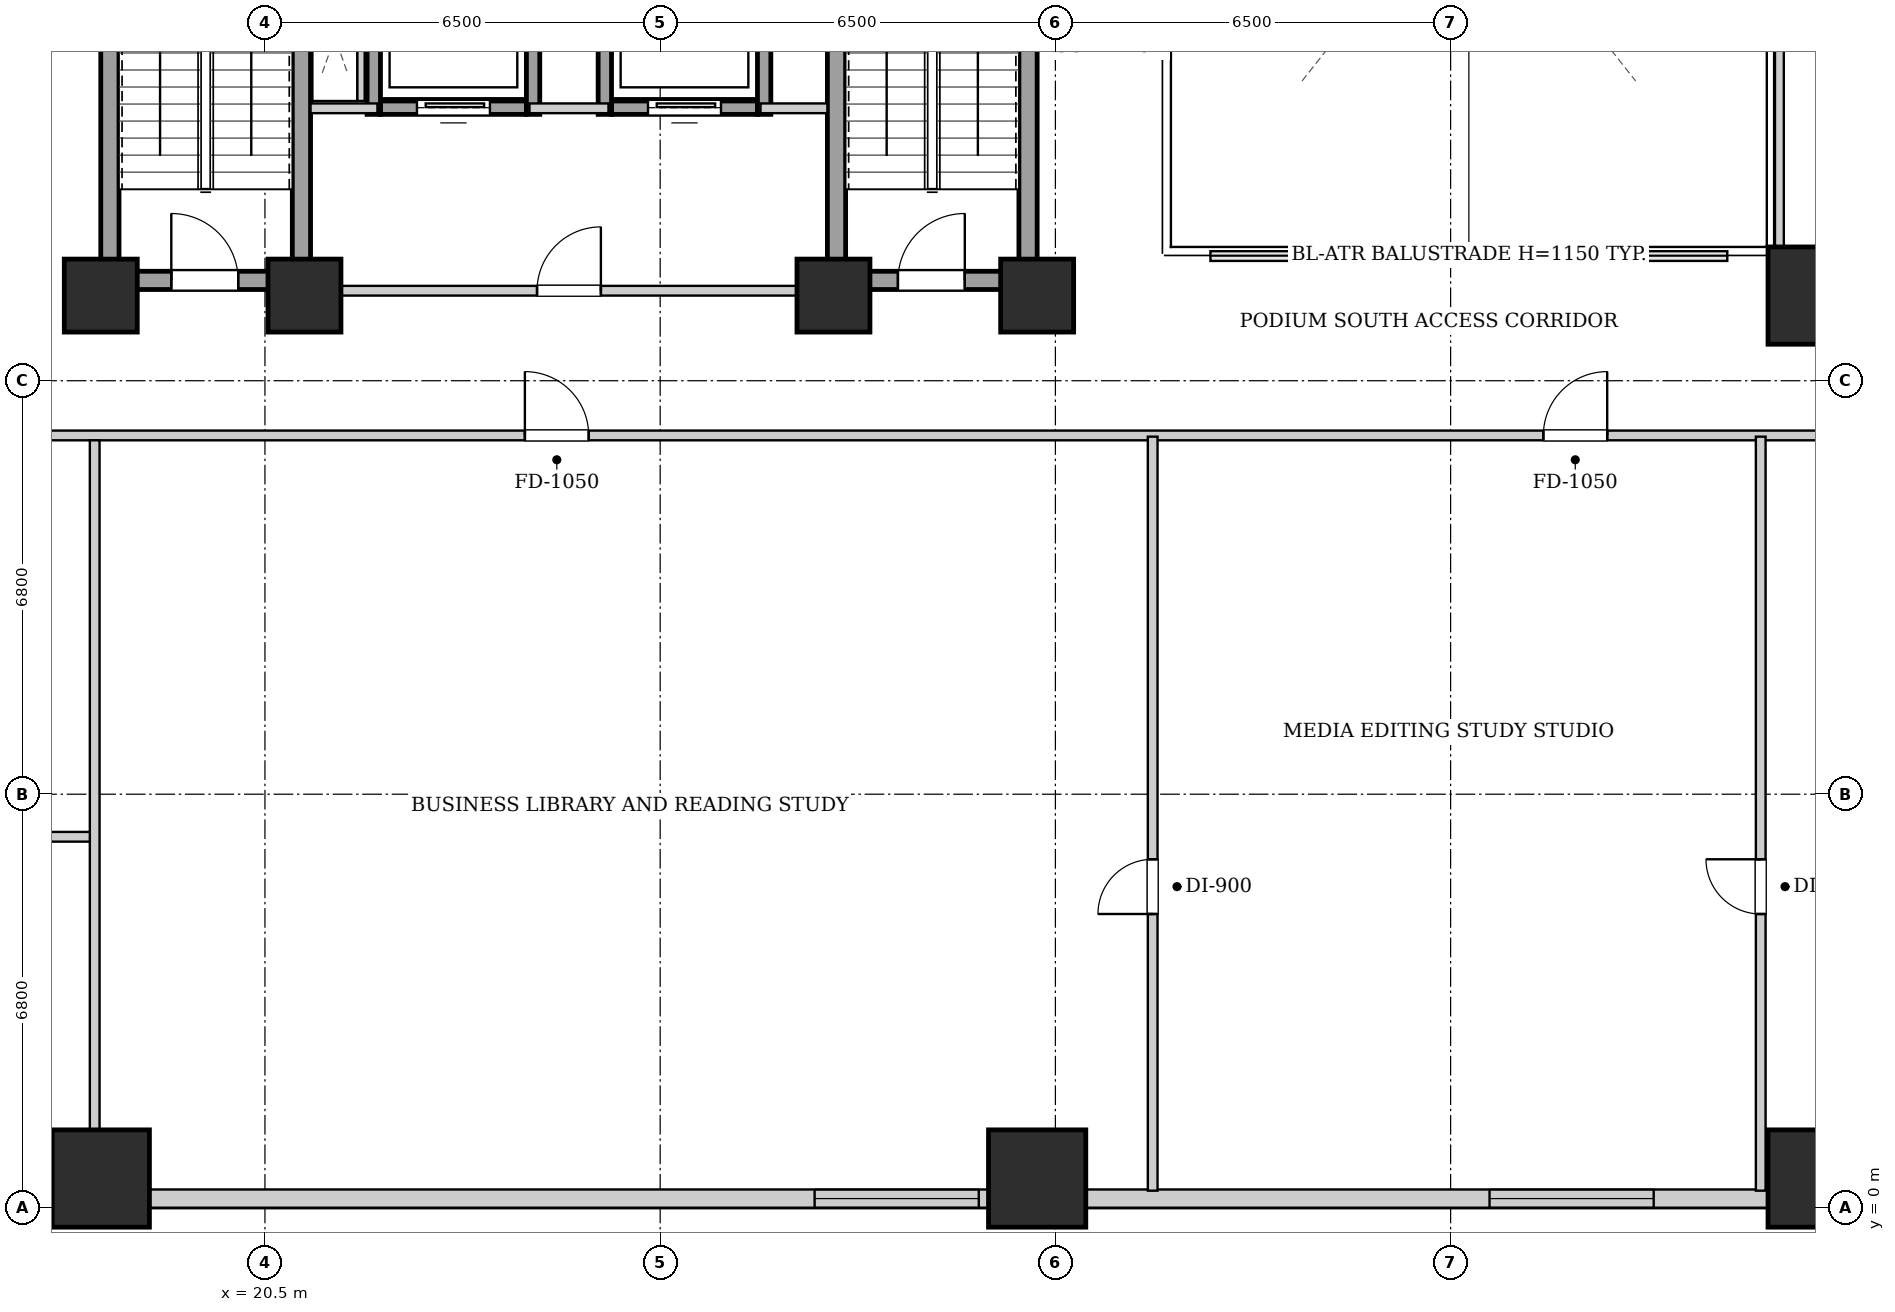
"""IFC4 building model, lengths in metres.
Left out: names, types, materials, properties, quantities, classifications, styles, units other than length and angle.
Written with IfcOpenShell. Run it as: python <this file> out.ifc"""

import sys

from ifc_helpers import new_model, si_unit, direction, frame, frame_2d, origin, origin_2d, place, context, subcontext, project, spatial, rectangle, extrude, element, fill, save


model = new_model("IFC4")
c1 = context("Model", 3, precision=1e-05, world=origin(), true_north=direction((0.0, 1.0)))
c2 = subcontext(c1, "Body", "Model", "MODEL_VIEW")
j1 = project(units=[si_unit("LENGTHUNIT", "METRE"), si_unit("PLANEANGLEUNIT", "RADIAN")], contexts=[c1])
p1 = place(None, origin())
s1 = spatial("IfcSite", under=j1, at=p1, CompositionType="ELEMENT")
p2 = place(p1, origin())
s2 = spatial("IfcBuilding", under=s1, at=p2, CompositionType="ELEMENT")
p3 = place(p2, frame((0.0, 0.0, 11.2)))
s3 = spatial("IfcBuildingStorey", under=s2, at=p3, CompositionType="ELEMENT", Elevation=11.2)
for number, where, z_axis, x_axis in (
    (1, (46.02, 0.48, 0.0), (0.0, 0.0, 1.0), (1.0, 0.0, 0.0)),
    (2, (46.02, 15.0, 0.0), (0.0, 0.0, 1.0), (1.0, 0.0, 0.0)),
    (3, (17.8, 0.48, 0.0), (0.0, 0.0, 1.0), (1.0, 0.0, 0.0)),
    (4, (33.2, 0.48, 0.0), (0.0, 0.0, 1.0), (1.0, 0.0, 0.0)),
):
    element("IfcColumn", number, at=place(p3, frame(where, z_axis=z_axis, x_axis=x_axis)), inside=s3, PredefinedType="COLUMN", context=c2, shape_type="SweptSolid", body=[
        extrude(rectangle(XDim=1.6, YDim=1.6, at=origin_2d()), origin(), (0.0, 0.0, 1.0), 4.8),
    ])
for number, where, z_axis, x_axis in (
    (5, (17.8, 15.0, 0.0), (0.0, 0.0, 1.0), (1.0, 0.0, 0.0)),
    (6, (21.15, 15.0, 0.0), (0.0, 0.0, 1.0), (1.0, 0.0, 0.0)),
    (7, (29.85, 15.0, 0.0), (0.0, 0.0, 1.0), (1.0, 0.0, 0.0)),
    (8, (33.2, 15.0, 0.0), (0.0, 0.0, 1.0), (1.0, 0.0, 0.0)),
):
    element("IfcColumn", number, at=place(p3, frame(where, z_axis=z_axis, x_axis=x_axis)), inside=s3, PredefinedType="COLUMN", context=c2, shape_type="SweptSolid", body=[
        extrude(rectangle(XDim=1.2, YDim=1.2, at=origin_2d()), origin(), (0.0, 0.0, 1.0), 4.8),
    ])
p4 = place(p3, frame((53.84, 0.15, 0.0), z_axis=(0.0, 0.0, 1.0), x_axis=(-1.0, 0.0, 0.0)))
e9 = element("IfcWall", 9, at=p4, inside=s3, PredefinedType="SOLIDWALL", context=c2, shape_type="SweptSolid", body=[
    extrude(rectangle(XDim=53.68, YDim=0.3, at=frame_2d((26.84, 0.0))), origin(), (0.0, 0.0, 1.0), 3.365),
])
p5 = place(p4, frame((4.0, 0.0, 0.9)))
e10 = element("IfcOpeningElement", 10, at=p5, cuts=e9, PredefinedType="OPENING", context=c2, shape_type="SweptSolid", body=[
    extrude(rectangle(XDim=2.7, YDim=2.1, at=frame_2d((1.35, 1.05))), frame((0.0, 0.16, 0.0), z_axis=(0.0, -1.0, 0.0), x_axis=(1.0, 0.0, 0.0)), (0.0, 0.0, 1.0), 0.32),
])
p6 = place(p4, frame((10.5, 0.0, 0.9)))
e11 = element("IfcOpeningElement", 11, at=p6, cuts=e9, PredefinedType="OPENING", context=c2, shape_type="SweptSolid", body=[
    extrude(rectangle(XDim=2.7, YDim=2.1, at=frame_2d((1.35, 1.05))), frame((0.0, 0.16, 0.0), z_axis=(0.0, -1.0, 0.0), x_axis=(1.0, 0.0, 0.0)), (0.0, 0.0, 1.0), 0.32),
])
p7 = place(p4, frame((21.6, 0.0, 0.9)))
e12 = element("IfcOpeningElement", 12, at=p7, cuts=e9, PredefinedType="OPENING", context=c2, shape_type="SweptSolid", body=[
    extrude(rectangle(XDim=2.7, YDim=2.1, at=frame_2d((1.35, 1.05))), frame((0.0, 0.16, 0.0), z_axis=(0.0, -1.0, 0.0), x_axis=(1.0, 0.0, 0.0)), (0.0, 0.0, 1.0), 0.32),
])
p8 = place(p4, frame((37.0, 0.0, 0.9)))
e13 = element("IfcOpeningElement", 13, at=p8, cuts=e9, PredefinedType="OPENING", context=c2, shape_type="SweptSolid", body=[
    extrude(rectangle(XDim=2.7, YDim=2.1, at=frame_2d((1.35, 1.05))), frame((0.0, 0.16, 0.0), z_axis=(0.0, -1.0, 0.0), x_axis=(1.0, 0.0, 0.0)), (0.0, 0.0, 1.0), 0.32),
])
p9 = place(p4, frame((42.2, 0.0, 0.9)))
e14 = element("IfcOpeningElement", 14, at=p9, cuts=e9, PredefinedType="OPENING", context=c2, shape_type="SweptSolid", body=[
    extrude(rectangle(XDim=2.7, YDim=2.1, at=frame_2d((1.35, 1.05))), frame((0.0, 0.16, 0.0), z_axis=(0.0, -1.0, 0.0), x_axis=(1.0, 0.0, 0.0)), (0.0, 0.0, 1.0), 0.32),
])
for number, where, z_axis, x_axis in (
    (15, (17.95, 15.1, 0.0), (0.0, 0.0, 1.0), (0.0, 1.0, 0.0)),
    (16, (21.1, 15.1, 0.0), (0.0, 0.0, 1.0), (0.0, 1.0, 0.0)),
):
    element("IfcWall", number, at=place(p3, frame(where, z_axis=z_axis, x_axis=x_axis)), inside=s3, PredefinedType="SHEAR", context=c2, shape_type="SweptSolid", body=[
        extrude(rectangle(XDim=9.0, YDim=0.3, at=frame_2d((4.5, 0.0))), origin(), (0.0, 0.0, 1.0), 4.48),
    ])
p10 = place(p3, frame((18.1, 15.25, 0.0), z_axis=(0.0, 0.0, 1.0), x_axis=(1.0, 0.0, 0.0)))
e17 = element("IfcWall", 17, at=p10, inside=s3, PredefinedType="SHEAR", context=c2, shape_type="SweptSolid", body=[
    extrude(rectangle(XDim=2.85, YDim=0.3, at=frame_2d((1.425, 0.0))), origin(), (0.0, 0.0, 1.0), 4.48),
])
p11 = place(p10, frame((0.86, 0.0, 0.0)))
e18 = element("IfcOpeningElement", 18, at=p11, cuts=e17, PredefinedType="OPENING", context=c2, shape_type="SweptSolid", body=[
    extrude(rectangle(XDim=1.1, YDim=2.05, at=frame_2d((0.55, 1.025))), frame((0.0, 0.16, 0.0), z_axis=(0.0, -1.0, 0.0), x_axis=(1.0, 0.0, 0.0)), (0.0, 0.0, 1.0), 0.32),
])
for number, where, z_axis, x_axis in (
    (19, (29.9, 15.1, 0.0), (0.0, 0.0, 1.0), (0.0, 1.0, 0.0)),
    (20, (33.05, 15.1, 0.0), (0.0, 0.0, 1.0), (0.0, 1.0, 0.0)),
):
    element("IfcWall", number, at=place(p3, frame(where, z_axis=z_axis, x_axis=x_axis)), inside=s3, PredefinedType="SHEAR", context=c2, shape_type="SweptSolid", body=[
        extrude(rectangle(XDim=9.0, YDim=0.3, at=frame_2d((4.5, 0.0))), origin(), (0.0, 0.0, 1.0), 4.48),
    ])
p12 = place(p3, frame((30.05, 15.25, 0.0), z_axis=(0.0, 0.0, 1.0), x_axis=(1.0, 0.0, 0.0)))
e21 = element("IfcWall", 21, at=p12, inside=s3, PredefinedType="SHEAR", context=c2, shape_type="SweptSolid", body=[
    extrude(rectangle(XDim=2.85, YDim=0.3, at=frame_2d((1.425, 0.0))), origin(), (0.0, 0.0, 1.0), 4.48),
])
p13 = place(p12, frame((0.86, 0.0, 0.0)))
e22 = element("IfcOpeningElement", 22, at=p13, cuts=e21, PredefinedType="OPENING", context=c2, shape_type="SweptSolid", body=[
    extrude(rectangle(XDim=1.1, YDim=2.05, at=frame_2d((0.55, 1.025))), frame((0.0, 0.16, 0.0), z_axis=(0.0, -1.0, 0.0), x_axis=(1.0, 0.0, 0.0)), (0.0, 0.0, 1.0), 0.32),
])
p14 = place(p3, frame((22.4, 18.09, 0.0), z_axis=(0.0, 0.0, 1.0), x_axis=(1.0, 0.0, 0.0)))
e23 = element("IfcWall", 23, at=p14, inside=s3, PredefinedType="SHEAR", context=c2, shape_type="SweptSolid", body=[
    extrude(rectangle(XDim=2.4, YDim=0.22, at=frame_2d((1.2, 0.0))), origin(), (0.0, 0.0, 1.0), 4.48),
])
p15 = place(p14, frame((0.6, 0.0, 0.0)))
e24 = element("IfcOpeningElement", 24, at=p15, cuts=e23, PredefinedType="OPENING", context=c2, shape_type="SweptSolid", body=[
    extrude(rectangle(XDim=1.2, YDim=2.15, at=frame_2d((0.6, 1.075))), frame((0.0, 0.12, 0.0), z_axis=(0.0, -1.0, 0.0), x_axis=(1.0, 0.0, 0.0)), (0.0, 0.0, 1.0), 0.24),
])
for number, where, z_axis, x_axis in (
    (25, (22.29, 17.98, 0.0), (0.0, 0.0, 1.0), (0.0, 1.0, 0.0)),
    (26, (24.91, 17.98, 0.0), (0.0, 0.0, 1.0), (0.0, 1.0, 0.0)),
):
    element("IfcWall", number, at=place(p3, frame(where, z_axis=z_axis, x_axis=x_axis)), inside=s3, PredefinedType="SHEAR", context=c2, shape_type="SweptSolid", body=[
        extrude(rectangle(XDim=2.54, YDim=0.22, at=frame_2d((1.27, 0.0))), origin(), (0.0, 0.0, 1.0), 4.48),
    ])
p16 = place(p3, frame((26.2, 18.09, 0.0), z_axis=(0.0, 0.0, 1.0), x_axis=(1.0, 0.0, 0.0)))
e27 = element("IfcWall", 27, at=p16, inside=s3, PredefinedType="SHEAR", context=c2, shape_type="SweptSolid", body=[
    extrude(rectangle(XDim=2.4, YDim=0.22, at=frame_2d((1.2, 0.0))), origin(), (0.0, 0.0, 1.0), 4.48),
])
p17 = place(p16, frame((0.6, 0.0, 0.0)))
e28 = element("IfcOpeningElement", 28, at=p17, cuts=e27, PredefinedType="OPENING", context=c2, shape_type="SweptSolid", body=[
    extrude(rectangle(XDim=1.2, YDim=2.15, at=frame_2d((0.6, 1.075))), frame((0.0, 0.12, 0.0), z_axis=(0.0, -1.0, 0.0), x_axis=(1.0, 0.0, 0.0)), (0.0, 0.0, 1.0), 0.24),
])
for number, where, z_axis, x_axis in (
    (29, (26.09, 17.98, 0.0), (0.0, 0.0, 1.0), (0.0, 1.0, 0.0)),
    (30, (28.71, 17.98, 0.0), (0.0, 0.0, 1.0), (0.0, 1.0, 0.0)),
):
    element("IfcWall", number, at=place(p3, frame(where, z_axis=z_axis, x_axis=x_axis)), inside=s3, PredefinedType="SHEAR", context=c2, shape_type="SweptSolid", body=[
        extrude(rectangle(XDim=2.54, YDim=0.22, at=frame_2d((1.27, 0.0))), origin(), (0.0, 0.0, 1.0), 4.48),
    ])
p18 = place(p3, frame((21.25, 15.08, 0.0), z_axis=(0.0, 0.0, 1.0), x_axis=(1.0, 0.0, 0.0)))
e31 = element("IfcWall", 31, at=p18, inside=s3, PredefinedType="PARTITIONING", context=c2, shape_type="SweptSolid", body=[
    extrude(rectangle(XDim=8.5, YDim=0.16, at=frame_2d((4.25, 0.0))), origin(), (0.0, 0.0, 1.0), 4.48),
])
p19 = place(p18, frame((3.725, 0.0, 0.0)))
e32 = element("IfcOpeningElement", 32, at=p19, cuts=e31, PredefinedType="OPENING", context=c2, shape_type="SweptSolid", body=[
    extrude(rectangle(XDim=1.05, YDim=2.05, at=frame_2d((0.525, 1.025))), frame((0.0, 0.09, 0.0), z_axis=(0.0, -1.0, 0.0), x_axis=(1.0, 0.0, 0.0)), (0.0, 0.0, 1.0), 0.18),
])
p20 = place(p3, frame((21.25, 18.08, 0.0), z_axis=(0.0, 0.0, 1.0), x_axis=(1.0, 0.0, 0.0)))
e33 = element("IfcWall", 33, at=p20, inside=s3, PredefinedType="PARTITIONING", context=c2, shape_type="SweptSolid", body=[
    extrude(rectangle(XDim=1.1, YDim=0.16, at=frame_2d((0.55, 0.0))), origin(), (0.0, 0.0, 1.0), 4.48),
])
p21 = place(p3, frame((24.85, 18.08, 0.0), z_axis=(0.0, 0.0, 1.0), x_axis=(1.0, 0.0, 0.0)))
e34 = element("IfcWall", 34, at=p21, inside=s3, PredefinedType="PARTITIONING", context=c2, shape_type="SweptSolid", body=[
    extrude(rectangle(XDim=1.3, YDim=0.16, at=frame_2d((0.65, 0.0))), origin(), (0.0, 0.0, 1.0), 4.48),
])
p22 = place(p3, frame((28.65, 18.08, 0.0), z_axis=(0.0, 0.0, 1.0), x_axis=(1.0, 0.0, 0.0)))
e35 = element("IfcWall", 35, at=p22, inside=s3, PredefinedType="PARTITIONING", context=c2, shape_type="SweptSolid", body=[
    extrude(rectangle(XDim=1.1, YDim=0.16, at=frame_2d((0.55, 0.0))), origin(), (0.0, 0.0, 1.0), 4.48),
])
p23 = place(p3, frame((22.08, 18.2, 0.0), z_axis=(0.0, 0.0, 1.0), x_axis=(0.0, 1.0, 0.0)))
e36 = element("IfcWall", 36, at=p23, inside=s3, PredefinedType="PARTITIONING", context=c2, shape_type="SweptSolid", body=[
    extrude(rectangle(XDim=2.12, YDim=0.12, at=frame_2d((1.06, 0.0))), origin(), (0.0, 0.0, 1.0), 4.48),
])
p24 = place(p3, frame((5.8, 12.7, 0.0), z_axis=(0.0, 0.0, 1.0), x_axis=(1.0, 0.0, 0.0)))
e37 = element("IfcWall", 37, at=p24, inside=s3, PredefinedType="PARTITIONING", context=c2, shape_type="SweptSolid", body=[
    extrude(rectangle(XDim=47.92, YDim=0.16, at=frame_2d((23.96, 0.0))), origin(), (0.0, 0.0, 1.0), 4.48),
])
p25 = place(p24, frame((3.8, 0.0, 0.0)))
e38 = element("IfcOpeningElement", 38, at=p25, cuts=e37, PredefinedType="OPENING", context=c2, shape_type="SweptSolid", body=[
    extrude(rectangle(XDim=0.9, YDim=2.05, at=frame_2d((0.45, 1.025))), frame((0.0, 0.09, 0.0), z_axis=(0.0, -1.0, 0.0), x_axis=(1.0, 0.0, 0.0)), (0.0, 0.0, 1.0), 0.18),
])
p26 = place(p24, frame((9.32, 0.0, 0.0)))
e39 = element("IfcOpeningElement", 39, at=p26, cuts=e37, PredefinedType="OPENING", context=c2, shape_type="SweptSolid", body=[
    extrude(rectangle(XDim=0.86, YDim=2.05, at=frame_2d((0.43, 1.025))), frame((0.0, 0.09, 0.0), z_axis=(0.0, -1.0, 0.0), x_axis=(1.0, 0.0, 0.0)), (0.0, 0.0, 1.0), 0.18),
])
p27 = place(p24, frame((18.975, 0.0, 0.0)))
e40 = element("IfcOpeningElement", 40, at=p27, cuts=e37, PredefinedType="OPENING", context=c2, shape_type="SweptSolid", body=[
    extrude(rectangle(XDim=1.05, YDim=2.05, at=frame_2d((0.525, 1.025))), frame((0.0, 0.09, 0.0), z_axis=(0.0, -1.0, 0.0), x_axis=(1.0, 0.0, 0.0)), (0.0, 0.0, 1.0), 0.18),
])
p28 = place(p24, frame((35.725, 0.0, 0.0)))
e41 = element("IfcOpeningElement", 41, at=p28, cuts=e37, PredefinedType="OPENING", context=c2, shape_type="SweptSolid", body=[
    extrude(rectangle(XDim=1.05, YDim=2.05, at=frame_2d((0.525, 1.025))), frame((0.0, 0.09, 0.0), z_axis=(0.0, -1.0, 0.0), x_axis=(1.0, 0.0, 0.0)), (0.0, 0.0, 1.0), 0.18),
])
p29 = place(p3, frame((6.18, 6.1, 0.0), z_axis=(0.0, 0.0, 1.0), x_axis=(1.0, 0.0, 0.0)))
e42 = element("IfcWall", 42, at=p29, inside=s3, PredefinedType="PARTITIONING", context=c2, shape_type="SweptSolid", body=[
    extrude(rectangle(XDim=11.5, YDim=0.16, at=frame_2d((5.75, 0.0))), origin(), (0.0, 0.0, 1.0), 4.48),
])
p30 = place(p3, frame((17.7, 0.6, 0.0), z_axis=(0.0, 0.0, 1.0), x_axis=(0.0, 1.0, 0.0)))
e43 = element("IfcWall", 43, at=p30, inside=s3, PredefinedType="PARTITIONING", context=c2, shape_type="SweptSolid", body=[
    extrude(rectangle(XDim=12.02, YDim=0.16, at=frame_2d((6.01, 0.0))), origin(), (0.0, 0.0, 1.0), 3.565),
])
p31 = place(p3, frame((45.4, 15.1, 0.0), z_axis=(0.0, 0.0, 1.0), x_axis=(0.0, 1.0, 0.0)))
e44 = element("IfcWall", 44, at=p31, inside=s3, PredefinedType="PARTITIONING", context=c2, shape_type="SweptSolid", body=[
    extrude(rectangle(XDim=13.78, YDim=0.16, at=frame_2d((6.89, 0.0))), origin(), (0.0, 0.0, 1.0), 4.48),
])
p32 = place(p3, frame((35.1, 0.28, 0.0), z_axis=(0.0, 0.0, 1.0), x_axis=(0.0, 1.0, 0.0)))
e45 = element("IfcWall", 45, at=p32, inside=s3, PredefinedType="PARTITIONING", context=c2, shape_type="SweptSolid", body=[
    extrude(rectangle(XDim=12.4, YDim=0.16, at=frame_2d((6.2, 0.0))), origin(), (0.0, 0.0, 1.0), 4.48),
])
p33 = place(p32, frame((4.55, 0.0, 0.0)))
e46 = element("IfcOpeningElement", 46, at=p33, cuts=e45, PredefinedType="OPENING", context=c2, shape_type="SweptSolid", body=[
    extrude(rectangle(XDim=0.9, YDim=2.05, at=frame_2d((0.45, 1.025))), frame((0.0, 0.09, 0.0), z_axis=(0.0, -1.0, 0.0), x_axis=(1.0, 0.0, 0.0)), (0.0, 0.0, 1.0), 0.18),
])
p34 = place(p3, frame((45.1, 0.28, 0.0), z_axis=(0.0, 0.0, 1.0), x_axis=(0.0, 1.0, 0.0)))
e47 = element("IfcWall", 47, at=p34, inside=s3, PredefinedType="PARTITIONING", context=c2, shape_type="SweptSolid", body=[
    extrude(rectangle(XDim=12.4, YDim=0.16, at=frame_2d((6.2, 0.0))), origin(), (0.0, 0.0, 1.0), 4.48),
])
p35 = place(p34, frame((4.55, 0.0, 0.0)))
e48 = element("IfcOpeningElement", 48, at=p35, cuts=e47, PredefinedType="OPENING", context=c2, shape_type="SweptSolid", body=[
    extrude(rectangle(XDim=0.9, YDim=2.05, at=frame_2d((0.45, 1.025))), frame((0.0, 0.09, 0.0), z_axis=(0.0, -1.0, 0.0), x_axis=(1.0, 0.0, 0.0)), (0.0, 0.0, 1.0), 0.18),
])
p36 = place(p11, origin())
e49 = element("IfcDoor", 49, at=p36, inside=s3, OperationType="SINGLE_SWING_LEFT", PredefinedType="DOOR", context=c2, shape_type="SweptSolid", body=[
    extrude(rectangle(XDim=1.1, YDim=2.05, at=frame_2d((0.55, 1.025))), frame((0.0, 0.025, 0.0), z_axis=(0.0, -1.0, 0.0), x_axis=(1.0, 0.0, 0.0)), (0.0, 0.0, 1.0), 0.05),
])
fill(e18, e49)
p37 = place(p13, origin())
e50 = element("IfcDoor", 50, at=p37, inside=s3, OperationType="SINGLE_SWING_RIGHT", PredefinedType="DOOR", context=c2, shape_type="SweptSolid", body=[
    extrude(rectangle(XDim=1.1, YDim=2.05, at=frame_2d((0.55, 1.025))), frame((0.0, 0.025, 0.0), z_axis=(0.0, -1.0, 0.0), x_axis=(1.0, 0.0, 0.0)), (0.0, 0.0, 1.0), 0.05),
])
fill(e22, e50)
p38 = place(p15, origin())
e51 = element("IfcDoor", 51, at=p38, inside=s3, OperationType="SLIDING_TO_LEFT", PredefinedType="DOOR", context=c2, shape_type="SweptSolid", body=[
    extrude(rectangle(XDim=1.2, YDim=2.15, at=frame_2d((0.6, 1.075))), frame((0.0, 0.025, 0.0), z_axis=(0.0, -1.0, 0.0), x_axis=(1.0, 0.0, 0.0)), (0.0, 0.0, 1.0), 0.05),
])
fill(e24, e51)
p39 = place(p17, origin())
e52 = element("IfcDoor", 52, at=p39, inside=s3, OperationType="SLIDING_TO_LEFT", PredefinedType="DOOR", context=c2, shape_type="SweptSolid", body=[
    extrude(rectangle(XDim=1.2, YDim=2.15, at=frame_2d((0.6, 1.075))), frame((0.0, 0.025, 0.0), z_axis=(0.0, -1.0, 0.0), x_axis=(1.0, 0.0, 0.0)), (0.0, 0.0, 1.0), 0.05),
])
fill(e28, e52)
p40 = place(p19, origin())
e53 = element("IfcDoor", 53, at=p40, inside=s3, OperationType="SINGLE_SWING_RIGHT", PredefinedType="DOOR", context=c2, shape_type="SweptSolid", body=[
    extrude(rectangle(XDim=1.05, YDim=2.05, at=frame_2d((0.525, 1.025))), frame((0.0, 0.025, 0.0), z_axis=(0.0, -1.0, 0.0), x_axis=(1.0, 0.0, 0.0)), (0.0, 0.0, 1.0), 0.05),
])
fill(e32, e53)
p41 = place(p27, origin())
e54 = element("IfcDoor", 54, at=p41, inside=s3, OperationType="SINGLE_SWING_LEFT", PredefinedType="DOOR", context=c2, shape_type="SweptSolid", body=[
    extrude(rectangle(XDim=1.05, YDim=2.05, at=frame_2d((0.525, 1.025))), frame((0.0, 0.025, 0.0), z_axis=(0.0, -1.0, 0.0), x_axis=(1.0, 0.0, 0.0)), (0.0, 0.0, 1.0), 0.05),
])
fill(e40, e54)
p42 = place(p28, origin())
e55 = element("IfcDoor", 55, at=p42, inside=s3, OperationType="SINGLE_SWING_RIGHT", PredefinedType="DOOR", context=c2, shape_type="SweptSolid", body=[
    extrude(rectangle(XDim=1.05, YDim=2.05, at=frame_2d((0.525, 1.025))), frame((0.0, 0.025, 0.0), z_axis=(0.0, -1.0, 0.0), x_axis=(1.0, 0.0, 0.0)), (0.0, 0.0, 1.0), 0.05),
])
fill(e41, e55)
p43 = place(p33, origin())
e56 = element("IfcDoor", 56, at=p43, inside=s3, OperationType="SINGLE_SWING_LEFT", PredefinedType="DOOR", context=c2, shape_type="SweptSolid", body=[
    extrude(rectangle(XDim=0.9, YDim=2.05, at=frame_2d((0.45, 1.025))), frame((0.0, 0.025, 0.0), z_axis=(0.0, -1.0, 0.0), x_axis=(1.0, 0.0, 0.0)), (0.0, 0.0, 1.0), 0.05),
])
fill(e46, e56)
p44 = place(p35, origin())
e57 = element("IfcDoor", 57, at=p44, inside=s3, OperationType="SINGLE_SWING_RIGHT", PredefinedType="DOOR", context=c2, shape_type="SweptSolid", body=[
    extrude(rectangle(XDim=0.9, YDim=2.05, at=frame_2d((0.45, 1.025))), frame((0.0, 0.025, 0.0), z_axis=(0.0, -1.0, 0.0), x_axis=(1.0, 0.0, 0.0)), (0.0, 0.0, 1.0), 0.05),
])
fill(e48, e57)
p45 = place(p6, origin())
e58 = element("IfcWindow", 58, at=p45, inside=s3, PartitioningType="TRIPLE_PANEL_VERTICAL", PredefinedType="WINDOW", context=c2, shape_type="SweptSolid", body=[
    extrude(rectangle(XDim=2.7, YDim=2.1, at=frame_2d((1.35, 1.05))), frame((0.0, 0.03, 0.0), z_axis=(0.0, -1.0, 0.0), x_axis=(1.0, 0.0, 0.0)), (0.0, 0.0, 1.0), 0.06),
])
fill(e11, e58)
p46 = place(p7, origin())
e59 = element("IfcWindow", 59, at=p46, inside=s3, PartitioningType="TRIPLE_PANEL_VERTICAL", PredefinedType="WINDOW", context=c2, shape_type="SweptSolid", body=[
    extrude(rectangle(XDim=2.7, YDim=2.1, at=frame_2d((1.35, 1.05))), frame((0.0, 0.03, 0.0), z_axis=(0.0, -1.0, 0.0), x_axis=(1.0, 0.0, 0.0)), (0.0, 0.0, 1.0), 0.06),
])
fill(e12, e59)
save(model, sys.argv[1])
